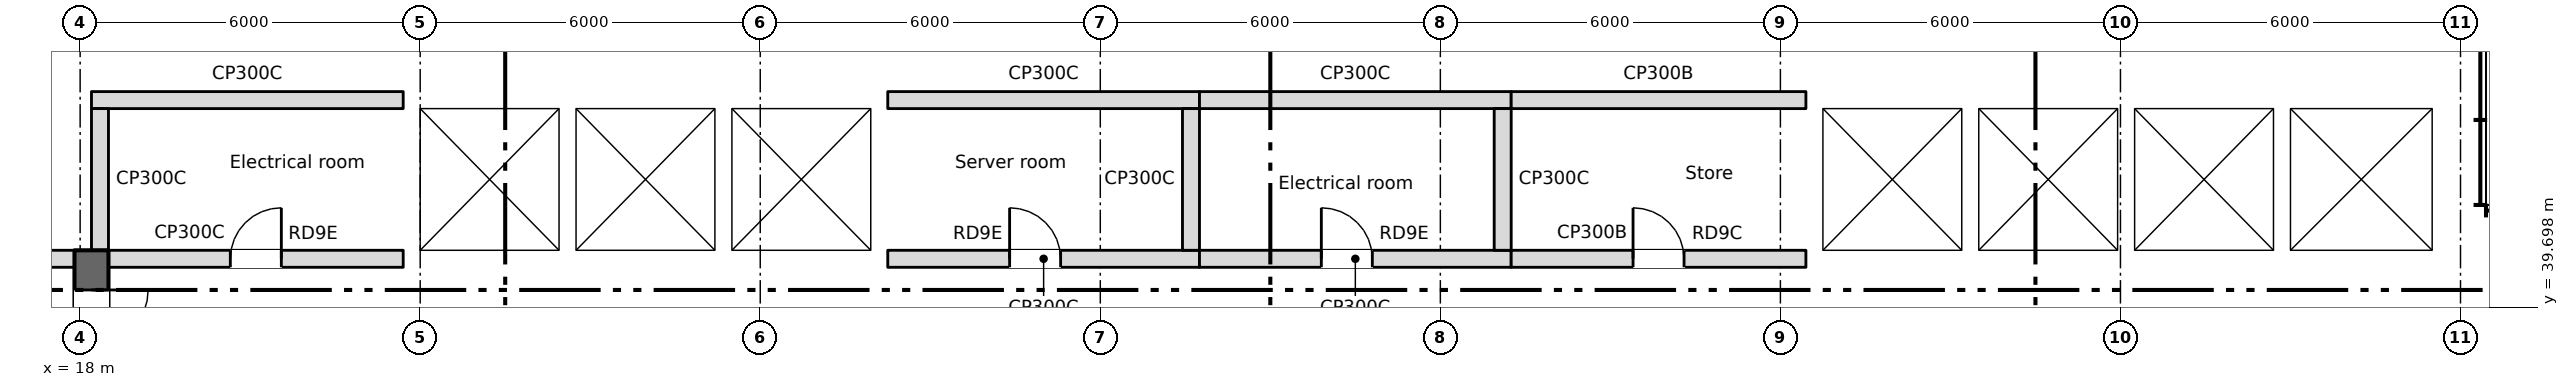
"""IFC4 building model, lengths in metres.
Left out: names, types, materials, properties, quantities, classifications, styles, units other than length and angle.
Written with IfcOpenShell. Run it as: python <this file> out.ifc"""

import sys

from ifc_helpers import new_model, si_unit, direction, frame, frame_2d, origin, place, context, subcontext, project, spatial, rectangle, extrude, element, fill, save


model = new_model("IFC4")
c1 = context("Model", 3, precision=1e-05, world=origin(), true_north=direction((0.0, 1.0)))
c2 = subcontext(c1, "Body", "Model", "MODEL_VIEW")
j1 = project(units=[si_unit("LENGTHUNIT", "METRE"), si_unit("PLANEANGLEUNIT", "RADIAN")], contexts=[c1])
p1 = place(None, origin())
s1 = spatial("IfcSite", under=j1, at=p1, CompositionType="ELEMENT")
p2 = place(p1, origin())
s2 = spatial("IfcBuilding", under=s1, at=p2, CompositionType="ELEMENT")
p3 = place(p2, frame((0.0, 0.0, 265.95)))
s3 = spatial("IfcBuildingStorey", under=s2, at=p3, CompositionType="ELEMENT", Elevation=265.95)
p4 = place(p3, frame((18.2, 40.7, 0.0), z_axis=(0.0, 0.0, 1.0), x_axis=(0.0, -1.0, 0.0)))
e1 = element("IfcWall", 1, at=p4, inside=s3, PredefinedType="SHEAR", context=c2, shape_type="SweptSolid", body=[
    extrude(rectangle(XDim=12.3, YDim=0.6, at=frame_2d((6.15, 0.0))), origin(), (0.0, 0.0, 1.0), 5.4),
])
p5 = place(p4, frame((0.7, 0.0, 0.0)))
e2 = element("IfcOpeningElement", 2, at=p5, cuts=e1, PredefinedType="OPENING", context=c2, shape_type="SweptSolid", body=[
    extrude(rectangle(XDim=2.0, YDim=2.1, at=frame_2d((1.0, 1.05))), frame((0.0, 0.31, 0.0), z_axis=(0.0, -1.0, 0.0), x_axis=(1.0, 0.0, 0.0)), (0.0, 0.0, 1.0), 0.62),
])
p6 = place(p3, frame((7.0, 40.55, 0.0), z_axis=(0.0, 0.0, 1.0), x_axis=(1.0, 0.0, 0.0)))
e3 = element("IfcWall", 3, at=p6, inside=s3, PredefinedType="PARTITIONING", context=c2, shape_type="SweptSolid", body=[
    extrude(rectangle(XDim=10.9, YDim=0.3, at=frame_2d((5.45, 0.0))), origin(), (0.0, 0.0, 1.0), 5.4),
])
p7 = place(p3, frame((23.7, 40.55, 0.0), z_axis=(0.0, 0.0, 1.0), x_axis=(1.0, 0.0, 0.0)))
e4 = element("IfcWall", 4, at=p7, inside=s3, PredefinedType="SHEAR", context=c2, shape_type="SweptSolid", body=[
    extrude(rectangle(XDim=8.55, YDim=0.3, at=frame_2d((4.275, 0.0))), origin(), (0.0, 0.0, 1.0), 5.1),
])
p8 = place(p7, frame((0.975, 0.0, 0.0)))
e5 = element("IfcOpeningElement", 5, at=p8, cuts=e4, PredefinedType="OPENING", context=c2, shape_type="SweptSolid", body=[
    extrude(rectangle(XDim=1.1, YDim=2.1, at=frame_2d((0.55, 1.05))), frame((0.0, 0.16, 0.0), z_axis=(0.0, -1.0, 0.0), x_axis=(1.0, 0.0, 0.0)), (0.0, 0.0, 1.0), 0.32),
])
p9 = place(p7, frame((3.725, 0.0, 0.0)))
e6 = element("IfcOpeningElement", 6, at=p9, cuts=e4, PredefinedType="OPENING", context=c2, shape_type="SweptSolid", body=[
    extrude(rectangle(XDim=1.1, YDim=2.1, at=frame_2d((0.55, 1.05))), frame((0.0, 0.16, 0.0), z_axis=(0.0, -1.0, 0.0), x_axis=(1.0, 0.0, 0.0)), (0.0, 0.0, 1.0), 0.32),
])
p10 = place(p7, frame((6.475, 0.0, 0.0)))
e7 = element("IfcOpeningElement", 7, at=p10, cuts=e4, PredefinedType="OPENING", context=c2, shape_type="SweptSolid", body=[
    extrude(rectangle(XDim=1.1, YDim=2.1, at=frame_2d((0.55, 1.05))), frame((0.0, 0.16, 0.0), z_axis=(0.0, -1.0, 0.0), x_axis=(1.0, 0.0, 0.0)), (0.0, 0.0, 1.0), 0.32),
])
p11 = place(p3, frame((23.7, 43.35, 0.0), z_axis=(0.0, 0.0, 1.0), x_axis=(1.0, 0.0, 0.0)))
e8 = element("IfcWall", 8, at=p11, inside=s3, PredefinedType="SHEAR", context=c2, shape_type="SweptSolid", body=[
    extrude(rectangle(XDim=8.55, YDim=0.3, at=frame_2d((4.275, 0.0))), origin(), (0.0, 0.0, 1.0), 5.1),
])
for number, where, z_axis, x_axis in (
    (9, (23.85, 40.7, 0.0), (0.0, 0.0, 1.0), (0.0, 1.0, 0.0)),
    (10, (32.1, 40.7, 0.0), (0.0, 0.0, 1.0), (0.0, 1.0, 0.0)),
    (11, (26.6, 40.7, 0.0), (0.0, 0.0, 1.0), (0.0, 1.0, 0.0)),
    (12, (29.35, 40.7, 0.0), (0.0, 0.0, 1.0), (0.0, 1.0, 0.0)),
):
    element("IfcWall", number, at=place(p3, frame(where, z_axis=z_axis, x_axis=x_axis)), inside=s3, PredefinedType="SHEAR", context=c2, shape_type="SweptSolid", body=[
        extrude(rectangle(XDim=2.5, YDim=0.3, at=frame_2d((1.25, 0.0))), origin(), (0.0, 0.0, 1.0), 5.1),
    ])
p12 = place(p3, frame((48.45, 40.55, 0.0), z_axis=(0.0, 0.0, 1.0), x_axis=(1.0, 0.0, 0.0)))
e13 = element("IfcWall", 13, at=p12, inside=s3, PredefinedType="SHEAR", context=c2, shape_type="SweptSolid", body=[
    extrude(rectangle(XDim=11.35, YDim=0.3, at=frame_2d((5.675, 0.0))), origin(), (0.0, 0.0, 1.0), 5.1),
])
p13 = place(p12, frame((0.975, 0.0, 0.0)))
e14 = element("IfcOpeningElement", 14, at=p13, cuts=e13, PredefinedType="OPENING", context=c2, shape_type="SweptSolid", body=[
    extrude(rectangle(XDim=1.1, YDim=2.1, at=frame_2d((0.55, 1.05))), frame((0.0, 0.16, 0.0), z_axis=(0.0, -1.0, 0.0), x_axis=(1.0, 0.0, 0.0)), (0.0, 0.0, 1.0), 0.32),
])
p14 = place(p12, frame((3.725, 0.0, 0.0)))
e15 = element("IfcOpeningElement", 15, at=p14, cuts=e13, PredefinedType="OPENING", context=c2, shape_type="SweptSolid", body=[
    extrude(rectangle(XDim=1.1, YDim=2.1, at=frame_2d((0.55, 1.05))), frame((0.0, 0.16, 0.0), z_axis=(0.0, -1.0, 0.0), x_axis=(1.0, 0.0, 0.0)), (0.0, 0.0, 1.0), 0.32),
])
p15 = place(p3, frame((48.45, 43.35, 0.0), z_axis=(0.0, 0.0, 1.0), x_axis=(1.0, 0.0, 0.0)))
e16 = element("IfcWall", 16, at=p15, inside=s3, PredefinedType="SHEAR", context=c2, shape_type="SweptSolid", body=[
    extrude(rectangle(XDim=11.35, YDim=0.3, at=frame_2d((5.675, 0.0))), origin(), (0.0, 0.0, 1.0), 5.1),
])
for number, where, z_axis, x_axis in (
    (17, (48.6, 40.7, 0.0), (0.0, 0.0, 1.0), (0.0, 1.0, 0.0)),
    (18, (59.65, 40.7, 0.0), (0.0, 0.0, 1.0), (0.0, 1.0, 0.0)),
    (19, (51.35, 40.7, 0.0), (0.0, 0.0, 1.0), (0.0, 1.0, 0.0)),
    (20, (54.1, 40.7, 0.0), (0.0, 0.0, 1.0), (0.0, 1.0, 0.0)),
    (21, (56.85, 40.7, 0.0), (0.0, 0.0, 1.0), (0.0, 1.0, 0.0)),
):
    element("IfcWall", number, at=place(p3, frame(where, z_axis=z_axis, x_axis=x_axis)), inside=s3, PredefinedType="SHEAR", context=c2, shape_type="SweptSolid", body=[
        extrude(rectangle(XDim=2.5, YDim=0.3, at=frame_2d((1.25, 0.0))), origin(), (0.0, 0.0, 1.0), 5.1),
    ])
p16 = place(p3, frame((18.5, 40.55, 0.0), z_axis=(0.0, 0.0, 1.0), x_axis=(1.0, 0.0, 0.0)))
e22 = element("IfcWall", 22, at=p16, inside=s3, PredefinedType="PARTITIONING", context=c2, shape_type="SweptSolid", body=[
    extrude(rectangle(XDim=5.2, YDim=0.3, at=frame_2d((2.6, 0.0))), origin(), (0.0, 0.0, 1.0), 5.4),
])
p17 = place(p16, frame((2.15, 0.0, 0.0)))
e23 = element("IfcOpeningElement", 23, at=p17, cuts=e22, PredefinedType="OPENING", context=c2, shape_type="SweptSolid", body=[
    extrude(rectangle(XDim=0.9, YDim=2.1, at=frame_2d((0.45, 1.05))), frame((0.0, 0.16, 0.0), z_axis=(0.0, -1.0, 0.0), x_axis=(1.0, 0.0, 0.0)), (0.0, 0.0, 1.0), 0.32),
])
p18 = place(p3, frame((18.2, 43.35, 0.0), z_axis=(0.0, 0.0, 1.0), x_axis=(1.0, 0.0, 0.0)))
e24 = element("IfcWall", 24, at=p18, inside=s3, PredefinedType="PARTITIONING", context=c2, shape_type="SweptSolid", body=[
    extrude(rectangle(XDim=5.5, YDim=0.3, at=frame_2d((2.75, 0.0))), origin(), (0.0, 0.0, 1.0), 5.4),
])
p19 = place(p3, frame((18.35, 40.7, 0.0), z_axis=(0.0, 0.0, 1.0), x_axis=(0.0, 1.0, 0.0)))
e25 = element("IfcWall", 25, at=p19, inside=s3, PredefinedType="PARTITIONING", context=c2, shape_type="SweptSolid", body=[
    extrude(rectangle(XDim=2.5, YDim=0.3, at=frame_2d((1.25, 0.0))), origin(), (0.0, 0.0, 1.0), 5.4),
])
p20 = place(p3, frame((32.25, 40.55, 0.0), z_axis=(0.0, 0.0, 1.0), x_axis=(1.0, 0.0, 0.0)))
e26 = element("IfcWall", 26, at=p20, inside=s3, PredefinedType="PARTITIONING", context=c2, shape_type="SweptSolid", body=[
    extrude(rectangle(XDim=5.5, YDim=0.3, at=frame_2d((2.75, 0.0))), origin(), (0.0, 0.0, 1.0), 5.4),
])
p21 = place(p20, frame((2.15, 0.0, 0.0)))
e27 = element("IfcOpeningElement", 27, at=p21, cuts=e26, PredefinedType="OPENING", context=c2, shape_type="SweptSolid", body=[
    extrude(rectangle(XDim=0.9, YDim=2.1, at=frame_2d((0.45, 1.05))), frame((0.0, 0.16, 0.0), z_axis=(0.0, -1.0, 0.0), x_axis=(1.0, 0.0, 0.0)), (0.0, 0.0, 1.0), 0.32),
])
p22 = place(p3, frame((32.25, 43.35, 0.0), z_axis=(0.0, 0.0, 1.0), x_axis=(1.0, 0.0, 0.0)))
e28 = element("IfcWall", 28, at=p22, inside=s3, PredefinedType="PARTITIONING", context=c2, shape_type="SweptSolid", body=[
    extrude(rectangle(XDim=5.5, YDim=0.3, at=frame_2d((2.75, 0.0))), origin(), (0.0, 0.0, 1.0), 5.4),
])
p23 = place(p3, frame((37.6, 40.7, 0.0), z_axis=(0.0, 0.0, 1.0), x_axis=(0.0, 1.0, 0.0)))
e29 = element("IfcWall", 29, at=p23, inside=s3, PredefinedType="PARTITIONING", context=c2, shape_type="SweptSolid", body=[
    extrude(rectangle(XDim=2.5, YDim=0.3, at=frame_2d((1.25, 0.0))), origin(), (0.0, 0.0, 1.0), 5.4),
])
p24 = place(p3, frame((37.75, 40.55, 0.0), z_axis=(0.0, 0.0, 1.0), x_axis=(1.0, 0.0, 0.0)))
e30 = element("IfcWall", 30, at=p24, inside=s3, PredefinedType="PARTITIONING", context=c2, shape_type="SweptSolid", body=[
    extrude(rectangle(XDim=5.5, YDim=0.3, at=frame_2d((2.75, 0.0))), origin(), (0.0, 0.0, 1.0), 5.4),
])
p25 = place(p24, frame((2.15, 0.0, 0.0)))
e31 = element("IfcOpeningElement", 31, at=p25, cuts=e30, PredefinedType="OPENING", context=c2, shape_type="SweptSolid", body=[
    extrude(rectangle(XDim=0.9, YDim=2.1, at=frame_2d((0.45, 1.05))), frame((0.0, 0.16, 0.0), z_axis=(0.0, -1.0, 0.0), x_axis=(1.0, 0.0, 0.0)), (0.0, 0.0, 1.0), 0.32),
])
p26 = place(p3, frame((37.75, 43.35, 0.0), z_axis=(0.0, 0.0, 1.0), x_axis=(1.0, 0.0, 0.0)))
e32 = element("IfcWall", 32, at=p26, inside=s3, PredefinedType="PARTITIONING", context=c2, shape_type="SweptSolid", body=[
    extrude(rectangle(XDim=5.5, YDim=0.3, at=frame_2d((2.75, 0.0))), origin(), (0.0, 0.0, 1.0), 5.4),
])
p27 = place(p3, frame((43.1, 40.7, 0.0), z_axis=(0.0, 0.0, 1.0), x_axis=(0.0, 1.0, 0.0)))
e33 = element("IfcWall", 33, at=p27, inside=s3, PredefinedType="PARTITIONING", context=c2, shape_type="SweptSolid", body=[
    extrude(rectangle(XDim=2.5, YDim=0.3, at=frame_2d((1.25, 0.0))), origin(), (0.0, 0.0, 1.0), 5.4),
])
p28 = place(p3, frame((43.25, 40.55, 0.0), z_axis=(0.0, 0.0, 1.0), x_axis=(1.0, 0.0, 0.0)))
e34 = element("IfcWall", 34, at=p28, inside=s3, PredefinedType="PARTITIONING", context=c2, shape_type="SweptSolid", body=[
    extrude(rectangle(XDim=5.2, YDim=0.3, at=frame_2d((2.6, 0.0))), origin(), (0.0, 0.0, 1.0), 5.4),
])
p29 = place(p28, frame((2.15, 0.0, 0.0)))
e35 = element("IfcOpeningElement", 35, at=p29, cuts=e34, PredefinedType="OPENING", context=c2, shape_type="SweptSolid", body=[
    extrude(rectangle(XDim=0.9, YDim=2.1, at=frame_2d((0.45, 1.05))), frame((0.0, 0.16, 0.0), z_axis=(0.0, -1.0, 0.0), x_axis=(1.0, 0.0, 0.0)), (0.0, 0.0, 1.0), 0.32),
])
p30 = place(p3, frame((43.25, 43.35, 0.0), z_axis=(0.0, 0.0, 1.0), x_axis=(1.0, 0.0, 0.0)))
e36 = element("IfcWall", 36, at=p30, inside=s3, PredefinedType="PARTITIONING", context=c2, shape_type="SweptSolid", body=[
    extrude(rectangle(XDim=5.2, YDim=0.3, at=frame_2d((2.6, 0.0))), origin(), (0.0, 0.0, 1.0), 5.4),
])
p31 = place(p5, origin())
e37 = element("IfcDoor", 37, at=p31, inside=s3, OperationType="DOUBLE_DOOR_SINGLE_SWING", PredefinedType="DOOR", context=c2, shape_type="SweptSolid", body=[
    extrude(rectangle(XDim=2.0, YDim=2.1, at=frame_2d((1.0, 1.05))), frame((0.0, 0.025, 0.0), z_axis=(0.0, -1.0, 0.0), x_axis=(1.0, 0.0, 0.0)), (0.0, 0.0, 1.0), 0.05),
])
fill(e2, e37)
p32 = place(p17, origin())
e38 = element("IfcDoor", 38, at=p32, inside=s3, OperationType="SINGLE_SWING_RIGHT", PredefinedType="DOOR", context=c2, shape_type="SweptSolid", body=[
    extrude(rectangle(XDim=0.9, YDim=2.1, at=frame_2d((0.45, 1.05))), frame((0.0, 0.025, 0.0), z_axis=(0.0, -1.0, 0.0), x_axis=(1.0, 0.0, 0.0)), (0.0, 0.0, 1.0), 0.05),
])
fill(e23, e38)
p33 = place(p21, origin())
e39 = element("IfcDoor", 39, at=p33, inside=s3, OperationType="SINGLE_SWING_LEFT", PredefinedType="DOOR", context=c2, shape_type="SweptSolid", body=[
    extrude(rectangle(XDim=0.9, YDim=2.1, at=frame_2d((0.45, 1.05))), frame((0.0, 0.025, 0.0), z_axis=(0.0, -1.0, 0.0), x_axis=(1.0, 0.0, 0.0)), (0.0, 0.0, 1.0), 0.05),
])
fill(e27, e39)
p34 = place(p25, origin())
e40 = element("IfcDoor", 40, at=p34, inside=s3, OperationType="SINGLE_SWING_LEFT", PredefinedType="DOOR", context=c2, shape_type="SweptSolid", body=[
    extrude(rectangle(XDim=0.9, YDim=2.1, at=frame_2d((0.45, 1.05))), frame((0.0, 0.025, 0.0), z_axis=(0.0, -1.0, 0.0), x_axis=(1.0, 0.0, 0.0)), (0.0, 0.0, 1.0), 0.05),
])
fill(e31, e40)
p35 = place(p29, origin())
e41 = element("IfcDoor", 41, at=p35, inside=s3, OperationType="SINGLE_SWING_LEFT", PredefinedType="DOOR", context=c2, shape_type="SweptSolid", body=[
    extrude(rectangle(XDim=0.9, YDim=2.1, at=frame_2d((0.45, 1.05))), frame((0.0, 0.025, 0.0), z_axis=(0.0, -1.0, 0.0), x_axis=(1.0, 0.0, 0.0)), (0.0, 0.0, 1.0), 0.05),
])
fill(e35, e41)
p36 = place(p8, origin())
e42 = element("IfcDoor", 42, at=p36, inside=s3, OperationType="SLIDING_TO_LEFT", PredefinedType="DOOR", context=c2, shape_type="SweptSolid", body=[
    extrude(rectangle(XDim=1.1, YDim=2.1, at=frame_2d((0.55, 1.05))), frame((0.0, 0.025, 0.0), z_axis=(0.0, -1.0, 0.0), x_axis=(1.0, 0.0, 0.0)), (0.0, 0.0, 1.0), 0.05),
])
fill(e5, e42)
p37 = place(p9, origin())
e43 = element("IfcDoor", 43, at=p37, inside=s3, OperationType="SLIDING_TO_LEFT", PredefinedType="DOOR", context=c2, shape_type="SweptSolid", body=[
    extrude(rectangle(XDim=1.1, YDim=2.1, at=frame_2d((0.55, 1.05))), frame((0.0, 0.025, 0.0), z_axis=(0.0, -1.0, 0.0), x_axis=(1.0, 0.0, 0.0)), (0.0, 0.0, 1.0), 0.05),
])
fill(e6, e43)
p38 = place(p10, origin())
e44 = element("IfcDoor", 44, at=p38, inside=s3, OperationType="SLIDING_TO_LEFT", PredefinedType="DOOR", context=c2, shape_type="SweptSolid", body=[
    extrude(rectangle(XDim=1.1, YDim=2.1, at=frame_2d((0.55, 1.05))), frame((0.0, 0.025, 0.0), z_axis=(0.0, -1.0, 0.0), x_axis=(1.0, 0.0, 0.0)), (0.0, 0.0, 1.0), 0.05),
])
fill(e7, e44)
p39 = place(p13, origin())
e45 = element("IfcDoor", 45, at=p39, inside=s3, OperationType="SLIDING_TO_LEFT", PredefinedType="DOOR", context=c2, shape_type="SweptSolid", body=[
    extrude(rectangle(XDim=1.1, YDim=2.1, at=frame_2d((0.55, 1.05))), frame((0.0, 0.025, 0.0), z_axis=(0.0, -1.0, 0.0), x_axis=(1.0, 0.0, 0.0)), (0.0, 0.0, 1.0), 0.05),
])
fill(e14, e45)
p40 = place(p14, origin())
e46 = element("IfcDoor", 46, at=p40, inside=s3, OperationType="SLIDING_TO_LEFT", PredefinedType="DOOR", context=c2, shape_type="SweptSolid", body=[
    extrude(rectangle(XDim=1.1, YDim=2.1, at=frame_2d((0.55, 1.05))), frame((0.0, 0.025, 0.0), z_axis=(0.0, -1.0, 0.0), x_axis=(1.0, 0.0, 0.0)), (0.0, 0.0, 1.0), 0.05),
])
fill(e15, e46)
save(model, sys.argv[1])
